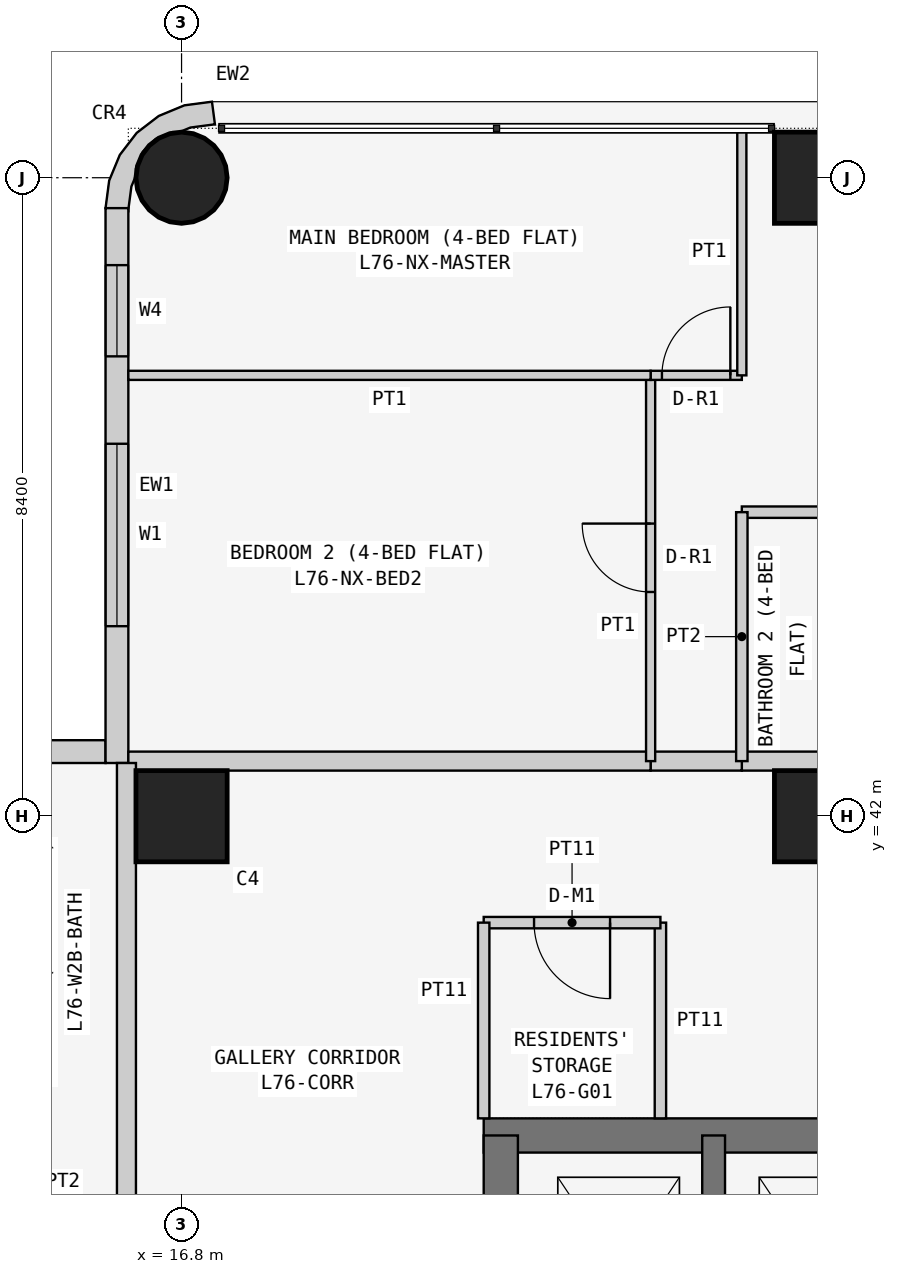
"""IFC4 building model, lengths in metres.
Left out: names, types, materials, properties, quantities, classifications, styles, units other than length and angle.
Written with IfcOpenShell. Run it as: python <this file> out.ifc"""

import sys

from ifc_helpers import new_model, si_unit, direction, frame, frame_2d, origin, origin_2d, place, context, subcontext, project, spatial, polyline, rectangle, circle, outline, extrude, element, fill, save


model = new_model("IFC4")
c1 = context("Model", 3, precision=1e-05, world=origin(), true_north=direction((0.0, 1.0)))
c2 = subcontext(c1, "Body", "Model", "MODEL_VIEW")
j1 = project(units=[si_unit("LENGTHUNIT", "METRE"), si_unit("PLANEANGLEUNIT", "RADIAN")], contexts=[c1])
p1 = place(None, origin())
s1 = spatial("IfcSite", under=j1, at=p1, CompositionType="ELEMENT")
p2 = place(p1, origin())
s2 = spatial("IfcBuilding", under=s1, at=p2, CompositionType="ELEMENT")
p3 = place(p2, frame((0.0, 0.0, 290.1)))
s3 = spatial("IfcBuildingStorey", under=s2, at=p3, CompositionType="ELEMENT", Elevation=290.1)
p4 = place(p3, frame((16.8, 42.0, 0.0), z_axis=(0.0, 0.0, 1.0), x_axis=(1.0, 0.0, 0.0)))
e1 = element("IfcColumn", 1, at=p4, inside=s3, PredefinedType="COLUMN", context=c2, shape_type="SweptSolid", body=[
    extrude(rectangle(XDim=1.2, YDim=1.2, at=origin_2d()), origin(), (0.0, 0.0, 1.0), 3.6),
])
p5 = place(p3, frame((16.8, 50.4, 0.0), z_axis=(0.0, 0.0, 1.0), x_axis=(1.0, 0.0, 0.0)))
e2 = element("IfcColumn", 2, at=p5, inside=s3, PredefinedType="COLUMN", context=c2, shape_type="SweptSolid", body=[
    extrude(circle(Radius=0.6, at=origin_2d()), origin(), (0.0, 0.0, 1.0), 3.6),
])
for number, where, z_axis, x_axis in (
    (3, (25.2, 42.0, 0.0), (0.0, 0.0, 1.0), (1.0, 0.0, 0.0)),
    (4, (25.2, 50.4, 0.0), (0.0, 0.0, 1.0), (1.0, 0.0, 0.0)),
):
    element("IfcColumn", number, at=place(p3, frame(where, z_axis=z_axis, x_axis=x_axis)), inside=s3, PredefinedType="COLUMN", context=c2, shape_type="SweptSolid", body=[
        extrude(rectangle(XDim=1.2, YDim=1.2, at=origin_2d()), origin(), (0.0, 0.0, 1.0), 3.6),
    ])
p6 = place(p3, frame((37.8, 37.8, 0.0), z_axis=(0.0, 0.0, 1.0), x_axis=(-1.0, 0.0, 0.0)))
e5 = element("IfcWall", 5, at=p6, inside=s3, PredefinedType="SHEAR", context=c2, shape_type="SweptSolid", body=[
    extrude(rectangle(XDim=17.025, YDim=0.45, at=frame_2d((8.513, 0.0))), origin(), (0.0, 0.0, 1.0), 3.6),
])
p7 = place(p3, frame((21.0, 37.8, 0.0), z_axis=(0.0, 0.0, 1.0), x_axis=(0.0, -1.0, 0.0)))
e6 = element("IfcWall", 6, at=p7, inside=s3, PredefinedType="SHEAR", context=c2, shape_type="SweptSolid", body=[
    extrude(rectangle(XDim=17.025, YDim=0.45, at=frame_2d((8.513, 0.0))), origin(), (0.0, 0.0, 1.0), 3.6),
])
p8 = place(p7, frame((5.4, 0.0, 0.0)))
e7 = element("IfcOpeningElement", 7, at=p8, cuts=e6, PredefinedType="OPENING", context=c2, shape_type="SweptSolid", body=[
    extrude(rectangle(XDim=1.2, YDim=2.1, at=frame_2d((0.6, 1.05))), frame((0.0, 0.235, 0.0), z_axis=(0.0, -1.0, 0.0), x_axis=(1.0, 0.0, 0.0)), (0.0, 0.0, 1.0), 0.47),
])
p9 = place(p3, frame((23.8, 34.6, 0.0), z_axis=(0.0, 0.0, 1.0), x_axis=(0.0, 1.0, 0.0)))
e8 = element("IfcWall", 8, at=p9, inside=s3, PredefinedType="SHEAR", context=c2, shape_type="SweptSolid", body=[
    extrude(rectangle(XDim=3.2, YDim=0.3, at=frame_2d((1.6, 0.0))), origin(), (0.0, 0.0, 1.0), 3.6),
])
p10 = place(p3, frame((15.8, 42.85, 0.0), z_axis=(0.0, 0.0, 1.0), x_axis=(-1.0, 0.0, 0.0)))
e9 = element("IfcWall", 9, at=p10, inside=s3, PredefinedType="SOLIDWALL", context=c2, shape_type="SweptSolid", body=[
    extrude(rectangle(XDim=7.0, YDim=0.3, at=frame_2d((3.5, 0.0))), origin(), (0.0, 0.0, 1.0), 3.45),
])
p11 = place(p10, frame((1.5, 0.0, 0.9)))
e10 = element("IfcOpeningElement", 10, at=p11, cuts=e9, PredefinedType="OPENING", context=c2, shape_type="SweptSolid", body=[
    extrude(rectangle(XDim=2.4, YDim=1.5, at=frame_2d((1.2, 0.75))), frame((0.0, 0.16, 0.0), z_axis=(0.0, -1.0, 0.0), x_axis=(1.0, 0.0, 0.0)), (0.0, 0.0, 1.0), 0.32),
])
p12 = place(p10, frame((5.05, 0.0, 0.9)))
e11 = element("IfcOpeningElement", 11, at=p12, cuts=e9, PredefinedType="OPENING", context=c2, shape_type="SweptSolid", body=[
    extrude(rectangle(XDim=1.2, YDim=1.5, at=frame_2d((0.6, 0.75))), frame((0.0, 0.16, 0.0), z_axis=(0.0, -1.0, 0.0), x_axis=(1.0, 0.0, 0.0)), (0.0, 0.0, 1.0), 0.32),
])
p13 = place(p3, frame((15.95, 50.0, 0.0), z_axis=(0.0, 0.0, 1.0), x_axis=(0.0, -1.0, 0.0)))
e12 = element("IfcWall", 12, at=p13, inside=s3, PredefinedType="SOLIDWALL", context=c2, shape_type="SweptSolid", body=[
    extrude(rectangle(XDim=7.3, YDim=0.3, at=frame_2d((3.65, 0.0))), origin(), (0.0, 0.0, 1.0), 3.45),
])
p14 = place(p13, frame((3.1, 0.0, 0.9)))
e13 = element("IfcOpeningElement", 13, at=p14, cuts=e12, PredefinedType="OPENING", context=c2, shape_type="SweptSolid", body=[
    extrude(rectangle(XDim=2.4, YDim=1.5, at=frame_2d((1.2, 0.75))), frame((0.0, 0.16, 0.0), z_axis=(0.0, -1.0, 0.0), x_axis=(1.0, 0.0, 0.0)), (0.0, 0.0, 1.0), 0.32),
])
p15 = place(p13, frame((0.75, 0.0, 0.9)))
e14 = element("IfcOpeningElement", 14, at=p15, cuts=e12, PredefinedType="OPENING", context=c2, shape_type="SweptSolid", body=[
    extrude(rectangle(XDim=1.2, YDim=1.5, at=frame_2d((0.6, 0.75))), frame((0.0, 0.16, 0.0), z_axis=(0.0, -1.0, 0.0), x_axis=(1.0, 0.0, 0.0)), (0.0, 0.0, 1.0), 0.32),
])
p16 = place(p3, frame((17.162, 50.976, 0.0), z_axis=(0.0, 0.0, 1.0), x_axis=(-0.707106781187, 0.707106781187, 0.0)))
e15 = element("IfcWall", 15, at=p16, inside=s3, PredefinedType="SOLIDWALL", context=c2, shape_type="SweptSolid", body=[
    extrude(outline(polyline([(0.047, -0.129), (0.033, -0.143), (0.273, -0.327), (0.495, -0.037), (0.635, 0.301), (0.683, 0.663), (0.635, 1.025), (0.495, 1.363), (0.273, 1.653), (0.033, 1.469), (0.047, 1.455), (0.233, 1.212), (0.292, 1.069), (0.358, 1.003), (0.449, 0.782), (0.449, 0.543), (0.358, 0.322), (0.292, 0.257), (0.233, 0.114), (0.047, -0.129)])), origin(), (0.0, 0.0, 1.0), 3.45),
])
p17 = place(p3, frame((23.1, 38.025, 0.0), z_axis=(0.0, 0.0, 1.0), x_axis=(0.0, 1.0, 0.0)))
e16 = element("IfcWall", 16, at=p17, inside=s3, PredefinedType="PARTITIONING", context=c2, shape_type="SweptSolid", body=[
    extrude(rectangle(XDim=2.575, YDim=0.15, at=frame_2d((1.288, 0.0))), origin(), (0.0, 0.0, 1.0), 3.45),
])
p18 = place(p3, frame((23.1, 40.6, 0.0), z_axis=(0.0, 0.0, 1.0), x_axis=(-1.0, 0.0, 0.0)))
e17 = element("IfcWall", 17, at=p18, inside=s3, PredefinedType="PARTITIONING", context=c2, shape_type="SweptSolid", body=[
    extrude(rectangle(XDim=2.325, YDim=0.15, at=frame_2d((1.163, 0.0))), origin(), (0.0, 0.0, 1.0), 3.45),
])
p19 = place(p18, frame((0.663, 0.0, 0.0)))
e18 = element("IfcOpeningElement", 18, at=p19, cuts=e17, PredefinedType="OPENING", context=c2, shape_type="SweptSolid", body=[
    extrude(rectangle(XDim=1.0, YDim=2.1, at=frame_2d((0.5, 1.05))), frame((0.0, 0.085, 0.0), z_axis=(0.0, -1.0, 0.0), x_axis=(1.0, 0.0, 0.0)), (0.0, 0.0, 1.0), 0.17),
])
p20 = place(p3, frame((20.775, 40.6, 0.0), z_axis=(0.0, 0.0, 1.0), x_axis=(0.0, -1.0, 0.0)))
e19 = element("IfcWall", 19, at=p20, inside=s3, PredefinedType="PARTITIONING", context=c2, shape_type="SweptSolid", body=[
    extrude(rectangle(XDim=2.575, YDim=0.15, at=frame_2d((1.288, 0.0))), origin(), (0.0, 0.0, 1.0), 3.45),
])
p21 = place(p3, frame((24.171, 42.725, 0.0), z_axis=(0.0, 0.0, 1.0), x_axis=(1.0, 0.0, 0.0)))
e20 = element("IfcWall", 20, at=p21, inside=s3, PredefinedType="PARTITIONING", context=c2, shape_type="SweptSolid", body=[
    extrude(rectangle(XDim=2.629, YDim=0.25, at=frame_2d((1.314, 0.0))), origin(), (0.0, 0.0, 1.0), 3.45),
])
p22 = place(p3, frame((22.971, 42.725, 0.0), z_axis=(0.0, 0.0, 1.0), x_axis=(1.0, 0.0, 0.0)))
e21 = element("IfcWall", 21, at=p22, inside=s3, PredefinedType="PARTITIONING", context=c2, shape_type="SweptSolid", body=[
    extrude(rectangle(XDim=1.2, YDim=0.25, at=frame_2d((0.6, 0.0))), origin(), (0.0, 0.0, 1.0), 3.45),
])
p23 = place(p3, frame((16.1, 42.725, 0.0), z_axis=(0.0, 0.0, 1.0), x_axis=(1.0, 0.0, 0.0)))
e22 = element("IfcWall", 22, at=p23, inside=s3, PredefinedType="PARTITIONING", context=c2, shape_type="SweptSolid", body=[
    extrude(rectangle(XDim=6.871, YDim=0.25, at=frame_2d((3.436, 0.0))), origin(), (0.0, 0.0, 1.0), 3.45),
])
p24 = place(p3, frame((16.075, 36.229, 0.0), z_axis=(0.0, 0.0, 1.0), x_axis=(0.0, 1.0, 0.0)))
e23 = element("IfcWall", 23, at=p24, inside=s3, PredefinedType="PARTITIONING", context=c2, shape_type="SweptSolid", body=[
    extrude(rectangle(XDim=6.471, YDim=0.25, at=frame_2d((3.235, 0.0))), origin(), (0.0, 0.0, 1.0), 3.45),
])
p25 = place(p3, frame((26.8, 46.0, 0.0), z_axis=(0.0, 0.0, 1.0), x_axis=(-1.0, 0.0, 0.0)))
e24 = element("IfcWall", 24, at=p25, inside=s3, PredefinedType="PARTITIONING", context=c2, shape_type="SweptSolid", body=[
    extrude(rectangle(XDim=2.629, YDim=0.15, at=frame_2d((1.314, 0.0))), origin(), (0.0, 0.0, 1.0), 3.45),
])
p26 = place(p3, frame((24.171, 46.0, 0.0), z_axis=(0.0, 0.0, 1.0), x_axis=(0.0, -1.0, 0.0)))
e25 = element("IfcWall", 25, at=p26, inside=s3, PredefinedType="PARTITIONING", context=c2, shape_type="SweptSolid", body=[
    extrude(rectangle(XDim=3.275, YDim=0.15, at=frame_2d((1.637, 0.0))), origin(), (0.0, 0.0, 1.0), 3.45),
])
p27 = place(p3, frame((22.971, 42.725, 0.0), z_axis=(0.0, 0.0, 1.0), x_axis=(0.0, 1.0, 0.0)))
e26 = element("IfcWall", 26, at=p27, inside=s3, PredefinedType="PARTITIONING", context=c2, shape_type="SweptSolid", body=[
    extrude(rectangle(XDim=5.075, YDim=0.12, at=frame_2d((2.538, 0.0))), origin(), (0.0, 0.0, 1.0), 3.45),
])
p28 = place(p27, frame((2.225, 0.0, 0.0)))
e27 = element("IfcOpeningElement", 27, at=p28, cuts=e26, PredefinedType="OPENING", context=c2, shape_type="SweptSolid", body=[
    extrude(rectangle(XDim=0.9, YDim=2.1, at=frame_2d((0.45, 1.05))), frame((0.0, 0.07, 0.0), z_axis=(0.0, -1.0, 0.0), x_axis=(1.0, 0.0, 0.0)), (0.0, 0.0, 1.0), 0.14),
])
p29 = place(p3, frame((22.971, 47.8, 0.0), z_axis=(0.0, 0.0, 1.0), x_axis=(1.0, 0.0, 0.0)))
e28 = element("IfcWall", 28, at=p29, inside=s3, PredefinedType="PARTITIONING", context=c2, shape_type="SweptSolid", body=[
    extrude(rectangle(XDim=1.2, YDim=0.12, at=frame_2d((0.6, 0.0))), origin(), (0.0, 0.0, 1.0), 3.45),
])
p30 = place(p29, frame((0.149, 0.0, 0.0)))
e29 = element("IfcOpeningElement", 29, at=p30, cuts=e28, PredefinedType="OPENING", context=c2, shape_type="SweptSolid", body=[
    extrude(rectangle(XDim=0.9, YDim=2.1, at=frame_2d((0.45, 1.05))), frame((0.0, 0.07, 0.0), z_axis=(0.0, -1.0, 0.0), x_axis=(1.0, 0.0, 0.0)), (0.0, 0.0, 1.0), 0.14),
])
p31 = place(p3, frame((24.171, 47.8, 0.0), z_axis=(0.0, 0.0, 1.0), x_axis=(0.0, 1.0, 0.0)))
e30 = element("IfcWall", 30, at=p31, inside=s3, PredefinedType="PARTITIONING", context=c2, shape_type="SweptSolid", body=[
    extrude(rectangle(XDim=3.25, YDim=0.12, at=frame_2d((1.625, 0.0))), origin(), (0.0, 0.0, 1.0), 3.45),
])
p32 = place(p3, frame((22.971, 47.8, 0.0), z_axis=(0.0, 0.0, 1.0), x_axis=(-1.0, 0.0, 0.0)))
e31 = element("IfcWall", 31, at=p32, inside=s3, PredefinedType="PARTITIONING", context=c2, shape_type="SweptSolid", body=[
    extrude(rectangle(XDim=6.871, YDim=0.12, at=frame_2d((3.436, 0.0))), origin(), (0.0, 0.0, 1.0), 3.45),
])
p33 = place(p14, origin())
e32 = element("IfcWindow", 32, at=p33, inside=s3, PartitioningType="SINGLE_PANEL", PredefinedType="WINDOW", context=c2, shape_type="SweptSolid", body=[
    extrude(rectangle(XDim=2.4, YDim=1.5, at=frame_2d((1.2, 0.75))), frame((0.0, 0.03, 0.0), z_axis=(0.0, -1.0, 0.0), x_axis=(1.0, 0.0, 0.0)), (0.0, 0.0, 1.0), 0.06),
])
fill(e13, e32)
p34 = place(p15, origin())
e33 = element("IfcWindow", 33, at=p34, inside=s3, PartitioningType="SINGLE_PANEL", PredefinedType="WINDOW", context=c2, shape_type="SweptSolid", body=[
    extrude(rectangle(XDim=1.2, YDim=1.5, at=frame_2d((0.6, 0.75))), frame((0.0, 0.03, 0.0), z_axis=(0.0, -1.0, 0.0), x_axis=(1.0, 0.0, 0.0)), (0.0, 0.0, 1.0), 0.06),
])
fill(e14, e33)
p35 = place(p19, origin())
e34 = element("IfcDoor", 34, at=p35, inside=s3, OperationType="SINGLE_SWING_LEFT", PredefinedType="DOOR", context=c2, shape_type="SweptSolid", body=[
    extrude(rectangle(XDim=1.0, YDim=2.1, at=frame_2d((0.5, 1.05))), frame((0.0, 0.025, 0.0), z_axis=(0.0, -1.0, 0.0), x_axis=(1.0, 0.0, 0.0)), (0.0, 0.0, 1.0), 0.05),
])
fill(e18, e34)
p36 = place(p28, origin())
e35 = element("IfcDoor", 35, at=p36, inside=s3, OperationType="SINGLE_SWING_RIGHT", PredefinedType="DOOR", context=c2, shape_type="SweptSolid", body=[
    extrude(rectangle(XDim=0.9, YDim=2.1, at=frame_2d((0.45, 1.05))), frame((0.0, 0.025, 0.0), z_axis=(0.0, -1.0, 0.0), x_axis=(1.0, 0.0, 0.0)), (0.0, 0.0, 1.0), 0.05),
])
fill(e27, e35)
p37 = place(p30, origin())
e36 = element("IfcDoor", 36, at=p37, inside=s3, OperationType="SINGLE_SWING_RIGHT", PredefinedType="DOOR", context=c2, shape_type="SweptSolid", body=[
    extrude(rectangle(XDim=0.9, YDim=2.1, at=frame_2d((0.45, 1.05))), frame((0.0, 0.025, 0.0), z_axis=(0.0, -1.0, 0.0), x_axis=(1.0, 0.0, 0.0)), (0.0, 0.0, 1.0), 0.05),
])
fill(e29, e36)
save(model, sys.argv[1])
